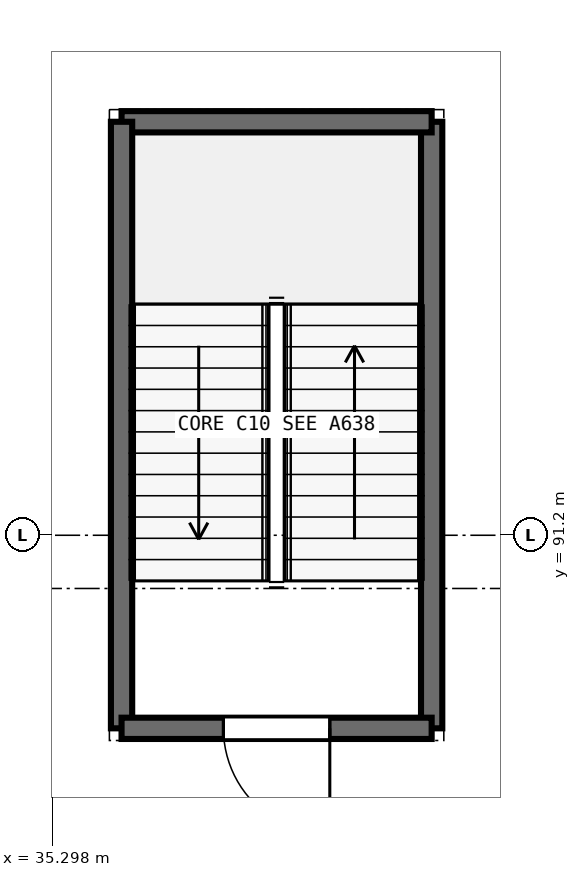
"""IFC4 building model, lengths in metres.
Left out: names, types, materials, properties, quantities, classifications, styles, units other than length and angle.
Written with IfcOpenShell. Run it as: python <this file> out.ifc"""

import sys

from ifc_helpers import new_model, si_unit, direction, frame, frame_2d, origin, place, context, subcontext, project, spatial, rectangle, extrude, element, fill, save


model = new_model("IFC4")
c1 = context("Model", 3, precision=1e-05, world=origin(), true_north=direction((0.0, 1.0)))
c2 = subcontext(c1, "Body", "Model", "MODEL_VIEW")
j1 = project(units=[si_unit("LENGTHUNIT", "METRE"), si_unit("PLANEANGLEUNIT", "RADIAN")], contexts=[c1])
p1 = place(None, origin())
s1 = spatial("IfcSite", under=j1, at=p1, CompositionType="ELEMENT")
p2 = place(p1, origin())
s2 = spatial("IfcBuilding", under=s1, at=p2, CompositionType="ELEMENT")
p3 = place(p2, frame((0.0, 0.0, -4.8)))
s3 = spatial("IfcBuildingStorey", under=s2, at=p3, CompositionType="ELEMENT", Elevation=-4.8)
p4 = place(p3, frame((40.29, 88.66, 0.0), z_axis=(0.0, 0.0, 1.0), x_axis=(0.0, 1.0, 0.0)))
e1 = element("IfcWall", 1, at=p4, inside=s3, PredefinedType="SHEAR", context=c2, shape_type="SweptSolid", body=[
    extrude(rectangle(XDim=7.98, YDim=0.28, at=frame_2d((3.99, 0.0))), origin(), (0.0, 0.0, 1.0), 4.8),
])
p5 = place(p3, frame((40.29, 96.64, 0.0), z_axis=(0.0, 0.0, 1.0), x_axis=(-1.0, 0.0, 0.0)))
e2 = element("IfcWall", 2, at=p5, inside=s3, PredefinedType="SHEAR", context=c2, shape_type="SweptSolid", body=[
    extrude(rectangle(XDim=4.08, YDim=0.28, at=frame_2d((2.04, 0.0))), origin(), (0.0, 0.0, 1.0), 4.8),
])
p6 = place(p3, frame((36.21, 96.64, 0.0), z_axis=(0.0, 0.0, 1.0), x_axis=(0.0, -1.0, 0.0)))
e3 = element("IfcWall", 3, at=p6, inside=s3, PredefinedType="SHEAR", context=c2, shape_type="SweptSolid", body=[
    extrude(rectangle(XDim=7.98, YDim=0.28, at=frame_2d((3.99, 0.0))), origin(), (0.0, 0.0, 1.0), 4.8),
])
p7 = place(p3, frame((36.21, 88.66, 0.0), z_axis=(0.0, 0.0, 1.0), x_axis=(1.0, 0.0, 0.0)))
e4 = element("IfcWall", 4, at=p7, inside=s3, PredefinedType="SHEAR", context=c2, shape_type="SweptSolid", body=[
    extrude(rectangle(XDim=4.08, YDim=0.28, at=frame_2d((2.04, 0.0))), origin(), (0.0, 0.0, 1.0), 4.8),
])
p8 = place(p7, frame((1.34, 0.0, 0.0)))
e5 = element("IfcOpeningElement", 5, at=p8, cuts=e4, PredefinedType="OPENING", context=c2, shape_type="SweptSolid", body=[
    extrude(rectangle(XDim=1.4, YDim=2.2, at=frame_2d((0.7, 1.1))), frame((0.0, 0.15, 0.0), z_axis=(0.0, -1.0, 0.0), x_axis=(1.0, 0.0, 0.0)), (0.0, 0.0, 1.0), 0.3),
])
p9 = place(p8, frame((1.4, 0.0, 0.0), z_axis=(0.0, 0.0, 1.0), x_axis=(-1.0, 0.0, 0.0)))
e6 = element("IfcDoor", 6, at=p9, inside=s3, OperationType="SINGLE_SWING_LEFT", PredefinedType="DOOR", context=c2, shape_type="SweptSolid", body=[
    extrude(rectangle(XDim=1.4, YDim=2.2, at=frame_2d((0.7, 1.1))), frame((0.0, 0.025, 0.0), z_axis=(0.0, -1.0, 0.0), x_axis=(1.0, 0.0, 0.0)), (0.0, 0.0, 1.0), 0.05),
])
fill(e5, e6)
save(model, sys.argv[1])
